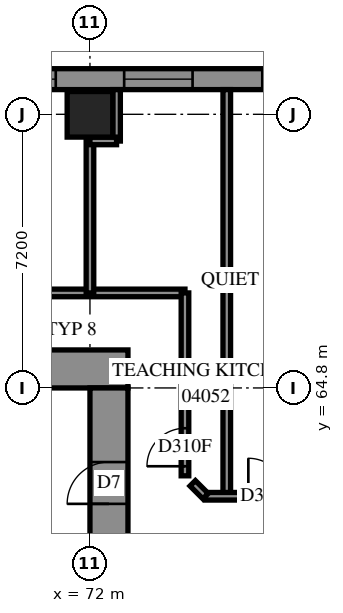
"""IFC4 building model, lengths in metres.
Left out: names, types, materials, properties, quantities, classifications, styles, units other than length and angle.
Written with IfcOpenShell. Run it as: python <this file> out.ifc"""

import sys

from ifc_helpers import new_model, si_unit, direction, frame, frame_2d, origin, origin_2d, place, context, subcontext, project, spatial, polyline, rectangle, outline, extrude, element, fill, save


model = new_model("IFC4")
c1 = context("Model", 3, precision=1e-05, world=origin(), true_north=direction((0.0, 1.0)))
c2 = subcontext(c1, "Body", "Model", "MODEL_VIEW")
j1 = project(units=[si_unit("LENGTHUNIT", "METRE"), si_unit("PLANEANGLEUNIT", "RADIAN")], contexts=[c1])
p1 = place(None, origin())
s1 = spatial("IfcSite", under=j1, at=p1, CompositionType="ELEMENT")
p2 = place(p1, origin())
s2 = spatial("IfcBuilding", under=s1, at=p2, CompositionType="ELEMENT")
p3 = place(p2, frame((0.0, 0.0, 18.6)))
s3 = spatial("IfcBuildingStorey", under=s2, at=p3, CompositionType="ELEMENT", Elevation=18.6)
p4 = place(p3, frame((72.0, 72.0, 0.0), z_axis=(0.0, 0.0, 1.0), x_axis=(1.0, 0.0, 0.0)))
e1 = element("IfcColumn", 1, at=p4, inside=s3, PredefinedType="COLUMN", context=c2, shape_type="SweptSolid", body=[
    extrude(rectangle(XDim=1.2, YDim=1.2, at=origin_2d()), origin(), (0.0, 0.0, 1.0), 3.8),
])
p5 = place(p3, frame((56.6, 65.3, -0.4), z_axis=(0.0, 0.0, 1.0), x_axis=(1.0, 0.0, 0.0)))
e2 = element("IfcWall", 2, at=p5, inside=s3, PredefinedType="SHEAR", context=c2, shape_type="SweptSolid", body=[
    extrude(rectangle(XDim=16.4, YDim=1.0, at=frame_2d((8.2, 0.0))), origin(), (0.0, 0.0, 1.0), 3.5),
])
p6 = place(p5, frame((11.0, 0.0, 0.4)))
e3 = element("IfcOpeningElement", 3, at=p6, cuts=e2, PredefinedType="OPENING", context=c2, shape_type="SweptSolid", body=[
    extrude(rectangle(XDim=0.8, YDim=2.1, at=frame_2d((0.4, 1.05))), frame((0.0, 0.51, 0.0), z_axis=(0.0, -1.0, 0.0), x_axis=(1.0, 0.0, 0.0)), (0.0, 0.0, 1.0), 1.02),
])
p7 = place(p3, frame((72.5, 50.4, -0.4), z_axis=(0.0, 0.0, 1.0), x_axis=(0.0, 1.0, 0.0)))
e4 = element("IfcWall", 4, at=p7, inside=s3, PredefinedType="SHEAR", context=c2, shape_type="SweptSolid", body=[
    extrude(rectangle(XDim=14.4, YDim=1.0, at=frame_2d((7.2, 0.0))), origin(), (0.0, 0.0, 1.0), 3.5),
])
p8 = place(p7, frame((4.55, 0.0, 0.4)))
e5 = element("IfcOpeningElement", 5, at=p8, cuts=e4, PredefinedType="OPENING", context=c2, shape_type="SweptSolid", body=[
    extrude(rectangle(XDim=1.1, YDim=2.1, at=frame_2d((0.55, 1.05))), frame((0.0, 0.51, 0.0), z_axis=(0.0, -1.0, 0.0), x_axis=(1.0, 0.0, 0.0)), (0.0, 0.0, 1.0), 1.02),
])
p9 = place(p7, frame((11.35, 0.0, 0.4)))
e6 = element("IfcOpeningElement", 6, at=p9, cuts=e4, PredefinedType="OPENING", context=c2, shape_type="SweptSolid", body=[
    extrude(rectangle(XDim=1.1, YDim=2.1, at=frame_2d((0.55, 1.05))), frame((0.0, 0.51, 0.0), z_axis=(0.0, -1.0, 0.0), x_axis=(1.0, 0.0, 0.0)), (0.0, 0.0, 1.0), 1.02),
])
p10 = place(p3, frame((79.583, 72.925, 0.0), z_axis=(0.0, 0.0, 1.0), x_axis=(-1.0, 0.0, 0.0)))
e7 = element("IfcWall", 7, at=p10, inside=s3, PredefinedType="SOLIDWALL", context=c2, shape_type="SweptSolid", body=[
    extrude(outline(polyline([(-0.114, -0.275), (79.583, -0.275), (79.033, 0.275), (0.114, 0.275), (-0.114, -0.275)])), origin(), (0.0, 0.0, 1.0), 3.8),
])
p11 = place(p10, frame((1.249, 0.0, 0.7)))
e8 = element("IfcOpeningElement", 8, at=p11, cuts=e7, PredefinedType="OPENING", context=c2, shape_type="SweptSolid", body=[
    extrude(rectangle(XDim=1.8, YDim=2.4, at=frame_2d((0.9, 1.2))), frame((0.0, 0.285, 0.0), z_axis=(0.0, -1.0, 0.0), x_axis=(1.0, 0.0, 0.0)), (0.0, 0.0, 1.0), 0.57),
])
p12 = place(p10, frame((4.883, 0.0, 0.7)))
e9 = element("IfcOpeningElement", 9, at=p12, cuts=e7, PredefinedType="OPENING", context=c2, shape_type="SweptSolid", body=[
    extrude(rectangle(XDim=1.8, YDim=2.4, at=frame_2d((0.9, 1.2))), frame((0.0, 0.285, 0.0), z_axis=(0.0, -1.0, 0.0), x_axis=(1.0, 0.0, 0.0)), (0.0, 0.0, 1.0), 0.57),
])
p13 = place(p10, frame((8.483, 0.0, 0.7)))
e10 = element("IfcOpeningElement", 10, at=p13, cuts=e7, PredefinedType="OPENING", context=c2, shape_type="SweptSolid", body=[
    extrude(rectangle(XDim=1.8, YDim=2.4, at=frame_2d((0.9, 1.2))), frame((0.0, 0.285, 0.0), z_axis=(0.0, -1.0, 0.0), x_axis=(1.0, 0.0, 0.0)), (0.0, 0.0, 1.0), 0.57),
])
p14 = place(p10, frame((12.083, 0.0, 0.7)))
e11 = element("IfcOpeningElement", 11, at=p14, cuts=e7, PredefinedType="OPENING", context=c2, shape_type="SweptSolid", body=[
    extrude(rectangle(XDim=1.8, YDim=2.4, at=frame_2d((0.9, 1.2))), frame((0.0, 0.285, 0.0), z_axis=(0.0, -1.0, 0.0), x_axis=(1.0, 0.0, 0.0)), (0.0, 0.0, 1.0), 0.57),
])
p15 = place(p10, frame((15.683, 0.0, 0.7)))
e12 = element("IfcOpeningElement", 12, at=p15, cuts=e7, PredefinedType="OPENING", context=c2, shape_type="SweptSolid", body=[
    extrude(rectangle(XDim=1.8, YDim=2.4, at=frame_2d((0.9, 1.2))), frame((0.0, 0.285, 0.0), z_axis=(0.0, -1.0, 0.0), x_axis=(1.0, 0.0, 0.0)), (0.0, 0.0, 1.0), 0.57),
])
p16 = place(p10, frame((19.283, 0.0, 0.7)))
e13 = element("IfcOpeningElement", 13, at=p16, cuts=e7, PredefinedType="OPENING", context=c2, shape_type="SweptSolid", body=[
    extrude(rectangle(XDim=1.8, YDim=2.4, at=frame_2d((0.9, 1.2))), frame((0.0, 0.285, 0.0), z_axis=(0.0, -1.0, 0.0), x_axis=(1.0, 0.0, 0.0)), (0.0, 0.0, 1.0), 0.57),
])
p17 = place(p10, frame((22.883, 0.0, 0.7)))
e14 = element("IfcOpeningElement", 14, at=p17, cuts=e7, PredefinedType="OPENING", context=c2, shape_type="SweptSolid", body=[
    extrude(rectangle(XDim=1.8, YDim=2.4, at=frame_2d((0.9, 1.2))), frame((0.0, 0.285, 0.0), z_axis=(0.0, -1.0, 0.0), x_axis=(1.0, 0.0, 0.0)), (0.0, 0.0, 1.0), 0.57),
])
p18 = place(p10, frame((26.483, 0.0, 0.7)))
e15 = element("IfcOpeningElement", 15, at=p18, cuts=e7, PredefinedType="OPENING", context=c2, shape_type="SweptSolid", body=[
    extrude(rectangle(XDim=1.8, YDim=2.4, at=frame_2d((0.9, 1.2))), frame((0.0, 0.285, 0.0), z_axis=(0.0, -1.0, 0.0), x_axis=(1.0, 0.0, 0.0)), (0.0, 0.0, 1.0), 0.57),
])
p19 = place(p10, frame((30.083, 0.0, 0.7)))
e16 = element("IfcOpeningElement", 16, at=p19, cuts=e7, PredefinedType="OPENING", context=c2, shape_type="SweptSolid", body=[
    extrude(rectangle(XDim=1.8, YDim=2.4, at=frame_2d((0.9, 1.2))), frame((0.0, 0.285, 0.0), z_axis=(0.0, -1.0, 0.0), x_axis=(1.0, 0.0, 0.0)), (0.0, 0.0, 1.0), 0.57),
])
p20 = place(p10, frame((33.683, 0.0, 0.7)))
e17 = element("IfcOpeningElement", 17, at=p20, cuts=e7, PredefinedType="OPENING", context=c2, shape_type="SweptSolid", body=[
    extrude(rectangle(XDim=1.8, YDim=2.4, at=frame_2d((0.9, 1.2))), frame((0.0, 0.285, 0.0), z_axis=(0.0, -1.0, 0.0), x_axis=(1.0, 0.0, 0.0)), (0.0, 0.0, 1.0), 0.57),
])
p21 = place(p10, frame((37.283, 0.0, 0.7)))
e18 = element("IfcOpeningElement", 18, at=p21, cuts=e7, PredefinedType="OPENING", context=c2, shape_type="SweptSolid", body=[
    extrude(rectangle(XDim=1.8, YDim=2.4, at=frame_2d((0.9, 1.2))), frame((0.0, 0.285, 0.0), z_axis=(0.0, -1.0, 0.0), x_axis=(1.0, 0.0, 0.0)), (0.0, 0.0, 1.0), 0.57),
])
p22 = place(p10, frame((40.883, 0.0, 0.7)))
e19 = element("IfcOpeningElement", 19, at=p22, cuts=e7, PredefinedType="OPENING", context=c2, shape_type="SweptSolid", body=[
    extrude(rectangle(XDim=1.8, YDim=2.4, at=frame_2d((0.9, 1.2))), frame((0.0, 0.285, 0.0), z_axis=(0.0, -1.0, 0.0), x_axis=(1.0, 0.0, 0.0)), (0.0, 0.0, 1.0), 0.57),
])
p23 = place(p10, frame((44.483, 0.0, 0.7)))
e20 = element("IfcOpeningElement", 20, at=p23, cuts=e7, PredefinedType="OPENING", context=c2, shape_type="SweptSolid", body=[
    extrude(rectangle(XDim=1.8, YDim=2.4, at=frame_2d((0.9, 1.2))), frame((0.0, 0.285, 0.0), z_axis=(0.0, -1.0, 0.0), x_axis=(1.0, 0.0, 0.0)), (0.0, 0.0, 1.0), 0.57),
])
p24 = place(p10, frame((48.083, 0.0, 0.7)))
e21 = element("IfcOpeningElement", 21, at=p24, cuts=e7, PredefinedType="OPENING", context=c2, shape_type="SweptSolid", body=[
    extrude(rectangle(XDim=1.8, YDim=2.4, at=frame_2d((0.9, 1.2))), frame((0.0, 0.285, 0.0), z_axis=(0.0, -1.0, 0.0), x_axis=(1.0, 0.0, 0.0)), (0.0, 0.0, 1.0), 0.57),
])
p25 = place(p10, frame((51.683, 0.0, 0.7)))
e22 = element("IfcOpeningElement", 22, at=p25, cuts=e7, PredefinedType="OPENING", context=c2, shape_type="SweptSolid", body=[
    extrude(rectangle(XDim=1.8, YDim=2.4, at=frame_2d((0.9, 1.2))), frame((0.0, 0.285, 0.0), z_axis=(0.0, -1.0, 0.0), x_axis=(1.0, 0.0, 0.0)), (0.0, 0.0, 1.0), 0.57),
])
p26 = place(p10, frame((55.283, 0.0, 0.7)))
e23 = element("IfcOpeningElement", 23, at=p26, cuts=e7, PredefinedType="OPENING", context=c2, shape_type="SweptSolid", body=[
    extrude(rectangle(XDim=1.8, YDim=2.4, at=frame_2d((0.9, 1.2))), frame((0.0, 0.285, 0.0), z_axis=(0.0, -1.0, 0.0), x_axis=(1.0, 0.0, 0.0)), (0.0, 0.0, 1.0), 0.57),
])
p27 = place(p10, frame((58.883, 0.0, 0.7)))
e24 = element("IfcOpeningElement", 24, at=p27, cuts=e7, PredefinedType="OPENING", context=c2, shape_type="SweptSolid", body=[
    extrude(rectangle(XDim=1.8, YDim=2.4, at=frame_2d((0.9, 1.2))), frame((0.0, 0.285, 0.0), z_axis=(0.0, -1.0, 0.0), x_axis=(1.0, 0.0, 0.0)), (0.0, 0.0, 1.0), 0.57),
])
p28 = place(p10, frame((62.483, 0.0, 0.7)))
e25 = element("IfcOpeningElement", 25, at=p28, cuts=e7, PredefinedType="OPENING", context=c2, shape_type="SweptSolid", body=[
    extrude(rectangle(XDim=1.8, YDim=2.4, at=frame_2d((0.9, 1.2))), frame((0.0, 0.285, 0.0), z_axis=(0.0, -1.0, 0.0), x_axis=(1.0, 0.0, 0.0)), (0.0, 0.0, 1.0), 0.57),
])
p29 = place(p10, frame((66.083, 0.0, 0.7)))
e26 = element("IfcOpeningElement", 26, at=p29, cuts=e7, PredefinedType="OPENING", context=c2, shape_type="SweptSolid", body=[
    extrude(rectangle(XDim=1.8, YDim=2.4, at=frame_2d((0.9, 1.2))), frame((0.0, 0.285, 0.0), z_axis=(0.0, -1.0, 0.0), x_axis=(1.0, 0.0, 0.0)), (0.0, 0.0, 1.0), 0.57),
])
p30 = place(p10, frame((69.683, 0.0, 0.7)))
e27 = element("IfcOpeningElement", 27, at=p30, cuts=e7, PredefinedType="OPENING", context=c2, shape_type="SweptSolid", body=[
    extrude(rectangle(XDim=1.8, YDim=2.4, at=frame_2d((0.9, 1.2))), frame((0.0, 0.285, 0.0), z_axis=(0.0, -1.0, 0.0), x_axis=(1.0, 0.0, 0.0)), (0.0, 0.0, 1.0), 0.57),
])
p31 = place(p10, frame((73.683, 0.0, 0.7)))
e28 = element("IfcOpeningElement", 28, at=p31, cuts=e7, PredefinedType="OPENING", context=c2, shape_type="SweptSolid", body=[
    extrude(rectangle(XDim=1.8, YDim=2.4, at=frame_2d((0.9, 1.2))), frame((0.0, 0.285, 0.0), z_axis=(0.0, -1.0, 0.0), x_axis=(1.0, 0.0, 0.0)), (0.0, 0.0, 1.0), 0.57),
])
p32 = place(p10, frame((76.508, 0.0, 0.7)))
e29 = element("IfcOpeningElement", 29, at=p32, cuts=e7, PredefinedType="OPENING", context=c2, shape_type="SweptSolid", body=[
    extrude(rectangle(XDim=1.8, YDim=2.4, at=frame_2d((0.9, 1.2))), frame((0.0, 0.285, 0.0), z_axis=(0.0, -1.0, 0.0), x_axis=(1.0, 0.0, 0.0)), (0.0, 0.0, 1.0), 0.57),
])
p33 = place(p3, frame((55.1, 67.3, 0.0), z_axis=(0.0, 0.0, 1.0), x_axis=(1.0, 0.0, 0.0)))
e30 = element("IfcWall", 30, at=p33, inside=s3, PredefinedType="PARTITIONING", context=c2, shape_type="SweptSolid", body=[
    extrude(rectangle(XDim=19.4, YDim=0.2, at=frame_2d((9.7, 0.0))), origin(), (0.0, 0.0, 1.0), 3.8),
])
p34 = place(p33, frame((6.058, 0.0, 0.0)))
e31 = element("IfcOpeningElement", 31, at=p34, cuts=e30, PredefinedType="OPENING", context=c2, shape_type="SweptSolid", body=[
    extrude(rectangle(XDim=1.0, YDim=2.1, at=frame_2d((0.5, 1.05))), frame((0.0, 0.11, 0.0), z_axis=(0.0, -1.0, 0.0), x_axis=(1.0, 0.0, 0.0)), (0.0, 0.0, 1.0), 0.22),
])
p35 = place(p33, frame((13.562, 0.0, 0.0)))
e32 = element("IfcOpeningElement", 32, at=p35, cuts=e30, PredefinedType="OPENING", context=c2, shape_type="SweptSolid", body=[
    extrude(rectangle(XDim=1.0, YDim=2.1, at=frame_2d((0.5, 1.05))), frame((0.0, 0.11, 0.0), z_axis=(0.0, -1.0, 0.0), x_axis=(1.0, 0.0, 0.0)), (0.0, 0.0, 1.0), 0.22),
])
p36 = place(p3, frame((75.6, 61.95, 0.0), z_axis=(0.0, 0.0, 1.0), x_axis=(0.0, 1.0, 0.0)))
e33 = element("IfcWall", 33, at=p36, inside=s3, PredefinedType="PARTITIONING", context=c2, shape_type="SweptSolid", body=[
    extrude(rectangle(XDim=10.7, YDim=0.2, at=frame_2d((5.35, 0.0))), origin(), (0.0, 0.0, 1.0), 3.8),
])
p37 = place(p3, frame((74.5, 62.488, 0.0), z_axis=(0.0, 0.0, 1.0), x_axis=(0.0, 1.0, 0.0)))
e34 = element("IfcWall", 34, at=p37, inside=s3, PredefinedType="PARTITIONING", context=c2, shape_type="SweptSolid", body=[
    extrude(rectangle(XDim=4.812, YDim=0.2, at=frame_2d((2.406, 0.0))), origin(), (0.0, 0.0, 1.0), 3.8),
])
p38 = place(p37, frame((0.252, 0.0, 0.0)))
e35 = element("IfcOpeningElement", 35, at=p38, cuts=e34, PredefinedType="OPENING", context=c2, shape_type="SweptSolid", body=[
    extrude(rectangle(XDim=1.0, YDim=2.1, at=frame_2d((0.5, 1.05))), frame((0.0, 0.11, 0.0), z_axis=(0.0, -1.0, 0.0), x_axis=(1.0, 0.0, 0.0)), (0.0, 0.0, 1.0), 0.22),
])
p39 = place(p3, frame((75.038, 61.95, 0.0), z_axis=(0.0, 0.0, 1.0), x_axis=(1.0, 0.0, 0.0)))
e36 = element("IfcWall", 36, at=p39, inside=s3, PredefinedType="PARTITIONING", context=c2, shape_type="SweptSolid", body=[
    extrude(rectangle(XDim=4.162, YDim=0.2, at=frame_2d((2.081, 0.0))), origin(), (0.0, 0.0, 1.0), 3.8),
])
p40 = place(p39, frame((1.129, 0.0, 0.0)))
e37 = element("IfcOpeningElement", 37, at=p40, cuts=e36, PredefinedType="OPENING", context=c2, shape_type="SweptSolid", body=[
    extrude(rectangle(XDim=1.0, YDim=2.1, at=frame_2d((0.5, 1.05))), frame((0.0, 0.11, 0.0), z_axis=(0.0, -1.0, 0.0), x_axis=(1.0, 0.0, 0.0)), (0.0, 0.0, 1.0), 0.22),
])
p41 = place(p3, frame((72.0, 67.3, 0.0), z_axis=(0.0, 0.0, 1.0), x_axis=(0.0, 1.0, 0.0)))
e38 = element("IfcWall", 38, at=p41, inside=s3, PredefinedType="PARTITIONING", context=c2, shape_type="SweptSolid", body=[
    extrude(rectangle(XDim=3.996, YDim=0.2, at=frame_2d((1.998, 0.0))), origin(), (0.0, 0.0, 1.0), 3.8),
])
p42 = place(p3, frame((72.7, 71.296, 0.0), z_axis=(0.0, 0.0, 1.0), x_axis=(0.0, 1.0, 0.0)))
e39 = element("IfcWall", 39, at=p42, inside=s3, PredefinedType="PARTITIONING", context=c2, shape_type="SweptSolid", body=[
    extrude(rectangle(XDim=1.354, YDim=0.2, at=frame_2d((0.677, 0.0))), origin(), (0.0, 0.0, 1.0), 3.8),
])
p43 = place(p3, frame((72.0, 71.3, 0.0), z_axis=(0.0, 0.0, 1.0), x_axis=(1.0, 0.0, 0.0)))
e40 = element("IfcWall", 40, at=p43, inside=s3, PredefinedType="PARTITIONING", context=c2, shape_type="SweptSolid", body=[
    extrude(rectangle(XDim=0.7, YDim=0.2, at=frame_2d((0.35, 0.0))), origin(), (0.0, 0.0, 1.0), 3.8),
])
p44 = place(p3, frame((74.703, 62.291, 0.0), z_axis=(0.0, 0.0, 1.0), x_axis=(0.7071067812, -0.7071067812, 0.0)))
e41 = element("IfcWall", 41, at=p44, inside=s3, PredefinedType="PARTITIONING", context=c2, shape_type="SweptSolid", body=[
    extrude(rectangle(XDim=0.478, YDim=0.2, at=frame_2d((0.239, 0.0))), origin(), (0.0, 0.0, 1.0), 3.8),
])
p45 = place(p11, origin())
e42 = element("IfcWindow", 42, at=p45, inside=s3, PartitioningType="SINGLE_PANEL", PredefinedType="WINDOW", context=c2, shape_type="SweptSolid", body=[
    extrude(rectangle(XDim=1.8, YDim=2.4, at=frame_2d((0.9, 1.2))), frame((0.0, 0.155, 0.0), z_axis=(0.0, -1.0, 0.0), x_axis=(1.0, 0.0, 0.0)), (0.0, 0.0, 1.0), 0.06),
])
fill(e8, e42)
p46 = place(p12, origin())
e43 = element("IfcWindow", 43, at=p46, inside=s3, PartitioningType="SINGLE_PANEL", PredefinedType="WINDOW", context=c2, shape_type="SweptSolid", body=[
    extrude(rectangle(XDim=1.8, YDim=2.4, at=frame_2d((0.9, 1.2))), frame((0.0, 0.155, 0.0), z_axis=(0.0, -1.0, 0.0), x_axis=(1.0, 0.0, 0.0)), (0.0, 0.0, 1.0), 0.06),
])
fill(e9, e43)
p47 = place(p13, origin())
e44 = element("IfcWindow", 44, at=p47, inside=s3, PartitioningType="SINGLE_PANEL", PredefinedType="WINDOW", context=c2, shape_type="SweptSolid", body=[
    extrude(rectangle(XDim=1.8, YDim=2.4, at=frame_2d((0.9, 1.2))), frame((0.0, 0.155, 0.0), z_axis=(0.0, -1.0, 0.0), x_axis=(1.0, 0.0, 0.0)), (0.0, 0.0, 1.0), 0.06),
])
fill(e10, e44)
p48 = place(p9, origin())
e45 = element("IfcDoor", 45, at=p48, inside=s3, OperationType="SINGLE_SWING_RIGHT", PredefinedType="DOOR", context=c2, shape_type="SweptSolid", body=[
    extrude(rectangle(XDim=1.1, YDim=2.1, at=frame_2d((0.55, 1.05))), frame((0.0, 0.025, 0.0), z_axis=(0.0, -1.0, 0.0), x_axis=(1.0, 0.0, 0.0)), (0.0, 0.0, 1.0), 0.05),
])
fill(e6, e45)
p49 = place(p38, origin())
e46 = element("IfcDoor", 46, at=p49, inside=s3, OperationType="SINGLE_SWING_RIGHT", PredefinedType="DOOR", context=c2, shape_type="SweptSolid", body=[
    extrude(rectangle(XDim=1.0, YDim=2.1, at=frame_2d((0.5, 1.05))), frame((0.0, 0.025, 0.0), z_axis=(0.0, -1.0, 0.0), x_axis=(1.0, 0.0, 0.0)), (0.0, 0.0, 1.0), 0.05),
])
fill(e35, e46)
p50 = place(p40, origin())
e47 = element("IfcDoor", 47, at=p50, inside=s3, OperationType="SINGLE_SWING_LEFT", PredefinedType="DOOR", context=c2, shape_type="SweptSolid", body=[
    extrude(rectangle(XDim=1.0, YDim=2.1, at=frame_2d((0.5, 1.05))), frame((0.0, 0.025, 0.0), z_axis=(0.0, -1.0, 0.0), x_axis=(1.0, 0.0, 0.0)), (0.0, 0.0, 1.0), 0.05),
])
fill(e37, e47)
save(model, sys.argv[1])
